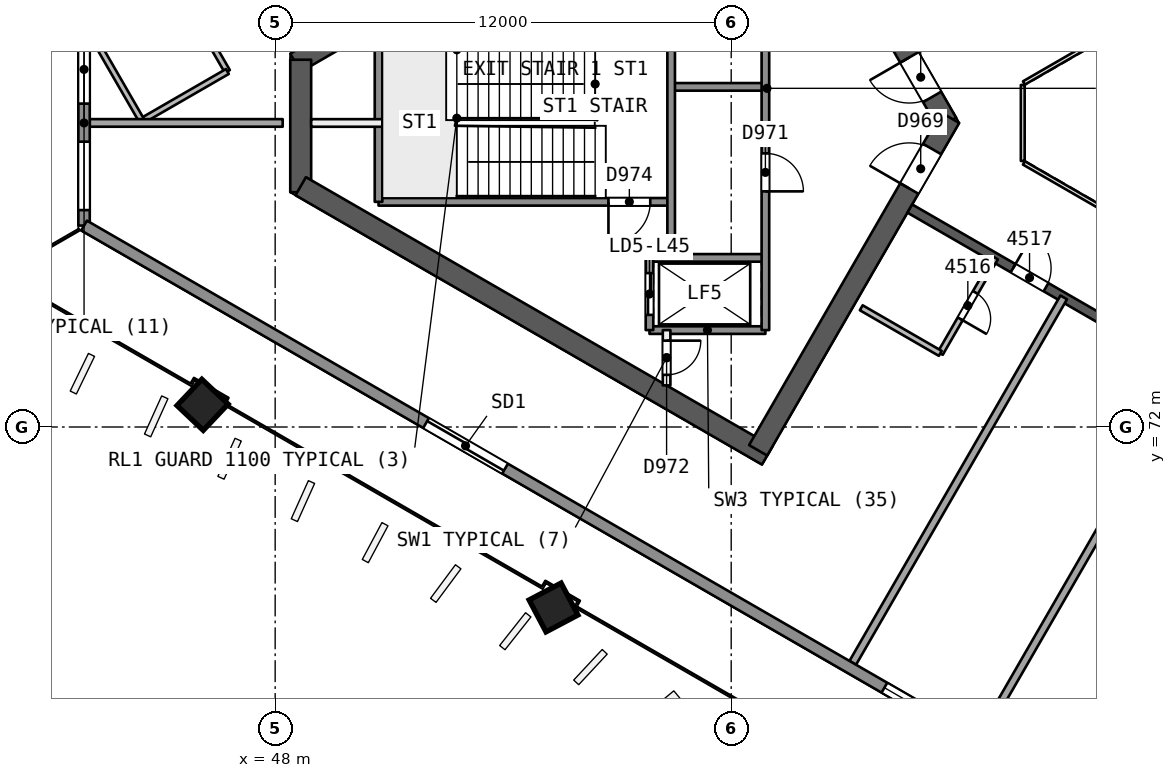
"""IFC4 building model, lengths in metres.
Left out: names, types, materials, properties, quantities, classifications, styles, units other than length and angle.
Written with IfcOpenShell. Run it as: python <this file> out.ifc"""

import sys

from ifc_helpers import new_model, si_unit, direction, frame, frame_2d, origin, origin_2d, place, context, subcontext, project, spatial, rectangle, extrude, element, fill, save


model = new_model("IFC4")
c1 = context("Model", 3, precision=1e-05, world=origin(), true_north=direction((0.0, 1.0)))
c2 = subcontext(c1, "Body", "Model", "MODEL_VIEW")
j1 = project(units=[si_unit("LENGTHUNIT", "METRE"), si_unit("PLANEANGLEUNIT", "RADIAN")], contexts=[c1])
p1 = place(None, origin())
s1 = spatial("IfcSite", under=j1, at=p1, CompositionType="ELEMENT")
p2 = place(p1, origin())
s2 = spatial("IfcBuilding", under=s1, at=p2, CompositionType="ELEMENT")
p3 = place(p2, frame((0.0, 0.0, 185.9)))
s3 = spatial("IfcBuildingStorey", under=s2, at=p3, CompositionType="ELEMENT", Elevation=185.9)
p4 = place(p3, frame((65.682, 80.0, 0.0), z_axis=(0.0, 0.0, 1.0), x_axis=(-0.500000202252, 0.866025287014, 0.0)))
e1 = element("IfcWall", 1, at=p4, inside=s3, PredefinedType="SHEAR", context=c2, shape_type="SweptSolid", body=[
    extrude(rectangle(XDim=10.221, YDim=0.55, at=frame_2d((5.111, 0.0))), origin(), (0.0, 0.0, 1.0), 3.7),
])
p5 = place(p4, frame((0.791, 0.0, 0.0)))
e2 = element("IfcOpeningElement", 2, at=p5, cuts=e1, PredefinedType="OPENING", context=c2, shape_type="SweptSolid", body=[
    extrude(rectangle(XDim=1.2, YDim=2.1, at=frame_2d((0.6, 1.05))), frame((0.0, 0.286, 0.0), z_axis=(0.0, -1.0, 0.0), x_axis=(1.0, 0.0, 0.0)), (0.0, 0.0, 1.0), 0.571),
])
p6 = place(p3, frame((60.709, 88.614, 0.0), z_axis=(0.0, 0.0, 1.0), x_axis=(-0.866020164116, -0.500009075263, 0.0)))
e3 = element("IfcWall", 3, at=p6, inside=s3, PredefinedType="SHEAR", context=c2, shape_type="SweptSolid", body=[
    extrude(rectangle(XDim=14.058, YDim=0.55, at=frame_2d((7.029, 0.0))), origin(), (0.0, 0.0, 1.0), 3.7),
])
p7 = place(p3, frame((48.672, 81.664, 0.0), z_axis=(0.0, 0.0, 1.0), x_axis=(0.0, -1.0, 0.0)))
e4 = element("IfcWall", 4, at=p7, inside=s3, PredefinedType="SHEAR", context=c2, shape_type="SweptSolid", body=[
    extrude(rectangle(XDim=3.487, YDim=0.55, at=frame_2d((1.743, 0.0))), origin(), (0.0, 0.0, 1.0), 3.7),
])
p8 = place(p3, frame((48.672, 78.336, 0.0), z_axis=(0.0, 0.0, 1.0), x_axis=(0.866023530946, -0.500003243837, 0.0)))
e5 = element("IfcWall", 5, at=p8, inside=s3, PredefinedType="SHEAR", context=c2, shape_type="SweptSolid", body=[
    extrude(rectangle(XDim=14.175, YDim=0.55, at=frame_2d((7.087, 0.0))), origin(), (0.0, 0.0, 1.0), 3.7),
])
p9 = place(p3, frame((60.709, 71.386, 0.0), z_axis=(0.0, 0.0, 1.0), x_axis=(0.500015938302, 0.866016201606, 0.0)))
e6 = element("IfcWall", 6, at=p9, inside=s3, PredefinedType="SHEAR", context=c2, shape_type="SweptSolid", body=[
    extrude(rectangle(XDim=10.105, YDim=0.55, at=frame_2d((5.053, 0.0))), origin(), (0.0, 0.0, 1.0), 3.7),
])
p10 = place(p9, frame((7.955, 0.0, 0.0)))
e7 = element("IfcOpeningElement", 7, at=p10, cuts=e6, PredefinedType="OPENING", context=c2, shape_type="SweptSolid", body=[
    extrude(rectangle(XDim=1.2, YDim=2.1, at=frame_2d((0.6, 1.05))), frame((0.0, 0.286, 0.0), z_axis=(0.0, -1.0, 0.0), x_axis=(1.0, 0.0, 0.0)), (0.0, 0.0, 1.0), 0.571),
])
p11 = place(p3, frame((64.7, 77.748, 0.0), z_axis=(0.0, 0.0, 1.0), x_axis=(0.866026492143, -0.499998114903, 0.0)))
e8 = element("IfcWall", 8, at=p11, inside=s3, PredefinedType="SHEAR", context=c2, shape_type="SweptSolid", body=[
    extrude(rectangle(XDim=15.588, YDim=0.25, at=frame_2d((7.794, 0.0))), origin(), (0.0, 0.0, 1.0), 3.25),
])
p12 = place(p11, frame((3.138, 0.0, 0.0)))
e9 = element("IfcOpeningElement", 9, at=p12, cuts=e8, PredefinedType="OPENING", context=c2, shape_type="SweptSolid", body=[
    extrude(rectangle(XDim=1.0, YDim=2.1, at=frame_2d((0.5, 1.05))), frame((0.0, 0.135, 0.0), z_axis=(0.0, -1.0, 0.0), x_axis=(1.0, 0.0, 0.0)), (0.0, 0.0, 1.0), 0.271),
])
p13 = place(p11, frame((6.175, 0.0, 0.0)))
e10 = element("IfcOpeningElement", 10, at=p13, cuts=e8, PredefinedType="OPENING", context=c2, shape_type="SweptSolid", body=[
    extrude(rectangle(XDim=0.9, YDim=2.1, at=frame_2d((0.45, 1.05))), frame((0.0, 0.135, 0.0), z_axis=(0.0, -1.0, 0.0), x_axis=(1.0, 0.0, 0.0)), (0.0, 0.0, 1.0), 0.271),
])
p14 = place(p11, frame((10.072, 0.0, 0.0)))
e11 = element("IfcOpeningElement", 11, at=p14, cuts=e8, PredefinedType="OPENING", context=c2, shape_type="SweptSolid", body=[
    extrude(rectangle(XDim=0.9, YDim=2.1, at=frame_2d((0.45, 1.05))), frame((0.0, 0.135, 0.0), z_axis=(0.0, -1.0, 0.0), x_axis=(1.0, 0.0, 0.0)), (0.0, 0.0, 1.0), 0.271),
])
p15 = place(p11, frame((13.53, 0.0, 0.0)))
e12 = element("IfcOpeningElement", 12, at=p15, cuts=e8, PredefinedType="OPENING", context=c2, shape_type="SweptSolid", body=[
    extrude(rectangle(XDim=1.0, YDim=2.1, at=frame_2d((0.5, 1.05))), frame((0.0, 0.135, 0.0), z_axis=(0.0, -1.0, 0.0), x_axis=(1.0, 0.0, 0.0)), (0.0, 0.0, 1.0), 0.271),
])
p16 = place(p3, frame((46.055, 72.575, 0.0), z_axis=(0.028557219273, 0.006859008786, 0.999568626571), x_axis=(-0.86641042505, 0.498876758723, 0.021329673472)))
e13 = element("IfcColumn", 13, at=p16, inside=s3, PredefinedType="COLUMN", context=c2, shape_type="SweptSolid", body=[
    extrude(rectangle(XDim=0.95, YDim=0.95, at=origin_2d()), origin(), (0.0, 0.0, 1.0), 3.702),
])
p17 = place(p3, frame((55.302, 67.237, 0.0), z_axis=(0.019327242333, 0.012137244332, 0.999739538582), x_axis=(-0.865685903399, 0.500474062253, 0.01065972171)))
e14 = element("IfcColumn", 14, at=p17, inside=s3, PredefinedType="COLUMN", context=c2, shape_type="SweptSolid", body=[
    extrude(rectangle(XDim=0.95, YDim=0.95, at=origin_2d()), origin(), (0.0, 0.0, 1.0), 3.701),
])
p18 = place(p3, frame((45.293, 83.866, 0.0), z_axis=(0.0, 0.0, 1.0), x_axis=(0.50005036918, -0.865996321171, 0.0)))
e15 = element("IfcWall", 15, at=p18, inside=s3, PredefinedType="PARTITIONING", context=c2, shape_type="SweptSolid", body=[
    extrude(rectangle(XDim=2.9, YDim=0.15, at=frame_2d((1.45, 0.0))), origin(), (0.0, 0.0, 1.0), 3.25),
])
p19 = place(p18, frame((1.05, 0.0, 0.0)))
e16 = element("IfcOpeningElement", 16, at=p19, cuts=e15, PredefinedType="OPENING", context=c2, shape_type="SweptSolid", body=[
    extrude(rectangle(XDim=0.8, YDim=2.1, at=frame_2d((0.4, 1.05))), frame((0.0, 0.085, 0.0), z_axis=(0.0, -1.0, 0.0), x_axis=(1.0, 0.0, 0.0)), (0.0, 0.0, 1.0), 0.171),
])
p20 = place(p3, frame((46.743, 81.354, 0.0), z_axis=(0.0, 0.0, 1.0), x_axis=(-0.866021400173, -0.500006934395, 0.0)))
e17 = element("IfcWall", 17, at=p20, inside=s3, PredefinedType="PARTITIONING", context=c2, shape_type="SweptSolid", body=[
    extrude(rectangle(XDim=2.6, YDim=0.15, at=frame_2d((1.3, 0.0))), origin(), (0.0, 0.0, 1.0), 3.25),
])
p21 = place(p3, frame((44.491, 80.054, 0.0), z_axis=(0.0, 0.0, 1.0), x_axis=(-0.500035825175, 0.866004719122, 0.0)))
e18 = element("IfcWall", 18, at=p21, inside=s3, PredefinedType="PARTITIONING", context=c2, shape_type="SweptSolid", body=[
    extrude(rectangle(XDim=2.742, YDim=0.15, at=frame_2d((1.371, 0.0))), origin(), (0.0, 0.0, 1.0), 3.25),
])
p22 = place(p3, frame((43.12, 80.001, 0.0), z_axis=(0.0, 0.0, 1.0), x_axis=(1.0, 0.0, 0.0)))
e19 = element("IfcWall", 19, at=p22, inside=s3, PredefinedType="PARTITIONING", context=c2, shape_type="SweptSolid", body=[
    extrude(rectangle(XDim=5.078, YDim=0.2, at=frame_2d((2.539, 0.0))), origin(), (0.0, 0.0, 1.0), 3.25),
])
p23 = place(p3, frame((66.952, 76.448, 0.0), z_axis=(0.0, 0.0, 1.0), x_axis=(-0.499987231761, -0.866032775405, 0.0)))
e20 = element("IfcWall", 20, at=p23, inside=s3, PredefinedType="PARTITIONING", context=c2, shape_type="SweptSolid", body=[
    extrude(rectangle(XDim=2.9, YDim=0.15, at=frame_2d((1.45, 0.0))), origin(), (0.0, 0.0, 1.0), 3.25),
])
p24 = place(p23, frame((1.05, 0.0, 0.0)))
e21 = element("IfcOpeningElement", 21, at=p24, cuts=e20, PredefinedType="OPENING", context=c2, shape_type="SweptSolid", body=[
    extrude(rectangle(XDim=0.8, YDim=2.1, at=frame_2d((0.4, 1.05))), frame((0.0, 0.085, 0.0), z_axis=(0.0, -1.0, 0.0), x_axis=(1.0, 0.0, 0.0)), (0.0, 0.0, 1.0), 0.171),
])
p25 = place(p3, frame((65.502, 73.937, 0.0), z_axis=(0.0, 0.0, 1.0), x_axis=(-0.865994240961, 0.500053971709, 0.0)))
e22 = element("IfcWall", 22, at=p25, inside=s3, PredefinedType="PARTITIONING", context=c2, shape_type="SweptSolid", body=[
    extrude(rectangle(XDim=2.401, YDim=0.15, at=frame_2d((1.201, 0.0))), origin(), (0.0, 0.0, 1.0), 3.25),
])
for number, where, z_axis, x_axis in (
    (23, (63.198, 65.794, 0.0), (0.0, 0.0, 1.0), (0.5, 0.866, 0.0)),
    (24, (66.573, 63.845, 0.0), (0.0, 0.0, 1.0), (0.5, 0.866, 0.0)),
):
    element("IfcWall", number, at=place(p3, frame(where, z_axis=z_axis, x_axis=x_axis)), inside=s3, PredefinedType="PARTITIONING", context=c2, shape_type="SweptSolid", body=[
        extrude(rectangle(XDim=11.104, YDim=0.2, at=frame_2d((5.552, 0.0))), origin(), (0.0, 0.0, 1.0), 3.25),
    ])
p26 = place(p3, frame((42.971, 77.3, 0.0), z_axis=(0.0, 0.0, 1.0), x_axis=(0.0, 1.0, 0.0)))
e25 = element("IfcWall", 25, at=p26, inside=s3, PredefinedType="SOLIDWALL", context=c2, shape_type="SweptSolid", body=[
    extrude(rectangle(XDim=5.399, YDim=0.3, at=frame_2d((2.7, 0.0))), origin(), (0.0, 0.0, 1.0), 3.25),
])
p27 = place(p26, frame((3.209, 0.0, 0.9)))
e26 = element("IfcOpeningElement", 26, at=p27, cuts=e25, PredefinedType="OPENING", context=c2, shape_type="SweptSolid", body=[
    extrude(rectangle(XDim=1.8, YDim=1.5, at=frame_2d((0.9, 0.75))), frame((0.0, 0.161, 0.0), z_axis=(0.0, -1.0, 0.0), x_axis=(1.0, 0.0, 0.0)), (0.0, 0.0, 1.0), 0.321),
])
p28 = place(p26, frame((0.407, 0.0, 0.9)))
e27 = element("IfcOpeningElement", 27, at=p28, cuts=e25, PredefinedType="OPENING", context=c2, shape_type="SweptSolid", body=[
    extrude(rectangle(XDim=1.8, YDim=1.5, at=frame_2d((0.9, 0.75))), frame((0.0, 0.161, 0.0), z_axis=(0.0, -1.0, 0.0), x_axis=(1.0, 0.0, 0.0)), (0.0, 0.0, 1.0), 0.321),
])
p29 = place(p3, frame((88.677, 50.912, 0.0), z_axis=(0.0, 0.0, 1.0), x_axis=(-0.866024890781, 0.500000888547, 0.0)))
e28 = element("IfcWall", 28, at=p29, inside=s3, PredefinedType="SOLIDWALL", context=c2, shape_type="SweptSolid", body=[
    extrude(rectangle(XDim=52.776, YDim=0.3, at=frame_2d((26.388, 0.0))), origin(), (0.0, 0.0, 1.0), 3.25),
])
p30 = place(p29, frame((18.953, 0.0, 0.0)))
e29 = element("IfcOpeningElement", 29, at=p30, cuts=e28, PredefinedType="OPENING", context=c2, shape_type="SweptSolid", body=[
    extrude(rectangle(XDim=2.4, YDim=2.4, at=frame_2d((1.2, 1.2))), frame((0.0, 0.161, 0.0), z_axis=(0.0, -1.0, 0.0), x_axis=(1.0, 0.0, 0.0)), (0.0, 0.0, 1.0), 0.321),
])
p31 = place(p29, frame((9.385, 0.0, 0.0)))
e30 = element("IfcOpeningElement", 30, at=p31, cuts=e28, PredefinedType="OPENING", context=c2, shape_type="SweptSolid", body=[
    extrude(rectangle(XDim=2.4, YDim=2.4, at=frame_2d((1.2, 1.2))), frame((0.0, 0.161, 0.0), z_axis=(0.0, -1.0, 0.0), x_axis=(1.0, 0.0, 0.0)), (0.0, 0.0, 1.0), 0.321),
])
p32 = place(p29, frame((39.984, 0.0, 0.0)))
e31 = element("IfcOpeningElement", 31, at=p32, cuts=e28, PredefinedType="OPENING", context=c2, shape_type="SweptSolid", body=[
    extrude(rectangle(XDim=2.4, YDim=2.4, at=frame_2d((1.2, 1.2))), frame((0.0, 0.161, 0.0), z_axis=(0.0, -1.0, 0.0), x_axis=(1.0, 0.0, 0.0)), (0.0, 0.0, 1.0), 0.321),
])
p33 = place(p29, frame((26.657, 0.0, 0.9)))
e32 = element("IfcOpeningElement", 32, at=p33, cuts=e28, PredefinedType="OPENING", context=c2, shape_type="SweptSolid", body=[
    extrude(rectangle(XDim=1.8, YDim=1.5, at=frame_2d((0.9, 0.75))), frame((0.0, 0.161, 0.0), z_axis=(0.0, -1.0, 0.0), x_axis=(1.0, 0.0, 0.0)), (0.0, 0.0, 1.0), 0.321),
])
p34 = place(p29, frame((22.76, 0.0, 0.9)))
e33 = element("IfcOpeningElement", 33, at=p34, cuts=e28, PredefinedType="OPENING", context=c2, shape_type="SweptSolid", body=[
    extrude(rectangle(XDim=1.8, YDim=1.5, at=frame_2d((0.9, 0.75))), frame((0.0, 0.161, 0.0), z_axis=(0.0, -1.0, 0.0), x_axis=(1.0, 0.0, 0.0)), (0.0, 0.0, 1.0), 0.321),
])
p35 = place(p3, frame((60.9, 80.95, 0.0), z_axis=(0.0, 0.0, 1.0), x_axis=(-1.0, 0.0, 0.0)))
e34 = element("IfcWall", 34, at=p35, inside=s3, PredefinedType="SOLIDWALL", context=c2, shape_type="SweptSolid", body=[
    extrude(rectangle(XDim=2.48, YDim=0.2, at=frame_2d((1.24, 0.0))), origin(), (0.0, 0.0, 1.0), 3.25),
])
p36 = place(p3, frame((50.82, 80.0, 0.0), z_axis=(0.0, 0.0, 1.0), x_axis=(-1.0, 0.0, 0.0)))
e35 = element("IfcWall", 35, at=p36, inside=s3, PredefinedType="PARTITIONING", context=c2, shape_type="SweptSolid", body=[
    extrude(rectangle(XDim=1.873, YDim=0.2, at=frame_2d((0.937, 0.0))), origin(), (0.0, 0.0, 1.0), 3.25),
])
p37 = place(p3, frame((58.42, 77.925, 0.0), z_axis=(0.0, 0.0, 1.0), x_axis=(-1.0, 0.0, 0.0)))
e36 = element("IfcWall", 36, at=p37, inside=s3, PredefinedType="SOLIDWALL", context=c2, shape_type="SweptSolid", body=[
    extrude(rectangle(XDim=7.7, YDim=0.2, at=frame_2d((3.85, 0.0))), origin(), (0.0, 0.0, 1.0), 3.25),
])
p38 = place(p37, frame((0.55, 0.0, 0.0)))
e37 = element("IfcOpeningElement", 37, at=p38, cuts=e36, PredefinedType="OPENING", context=c2, shape_type="SweptSolid", body=[
    extrude(rectangle(XDim=1.1, YDim=2.1, at=frame_2d((0.55, 1.05))), frame((0.0, 0.11, 0.0), z_axis=(0.0, -1.0, 0.0), x_axis=(1.0, 0.0, 0.0)), (0.0, 0.0, 1.0), 0.221),
])
for number, where, z_axis, x_axis in (
    (38, (60.9, 76.45, 0.0), (0.0, 0.0, 1.0), (-1.0, 0.0, 0.0)),
    (39, (60.9, 74.55, 0.0), (0.0, 0.0, 1.0), (-1.0, 0.0, 0.0)),
):
    element("IfcWall", number, at=place(p3, frame(where, z_axis=z_axis, x_axis=x_axis)), inside=s3, PredefinedType="SOLIDWALL", context=c2, shape_type="SweptSolid", body=[
        extrude(rectangle(XDim=3.05, YDim=0.2, at=frame_2d((1.525, 0.0))), origin(), (0.0, 0.0, 1.0), 3.25),
    ])
p39 = place(p3, frame((60.9, 85.45, 0.0), z_axis=(0.0, 0.0, 1.0), x_axis=(0.0, -1.0, 0.0)))
e40 = element("IfcWall", 40, at=p39, inside=s3, PredefinedType="SOLIDWALL", context=c2, shape_type="SweptSolid", body=[
    extrude(rectangle(XDim=10.9, YDim=0.2, at=frame_2d((5.45, 0.0))), origin(), (0.0, 0.0, 1.0), 3.25),
])
p40 = place(p39, frame((1.75, 0.0, 0.0)))
e41 = element("IfcOpeningElement", 41, at=p40, cuts=e40, PredefinedType="OPENING", context=c2, shape_type="SweptSolid", body=[
    extrude(rectangle(XDim=1.0, YDim=2.1, at=frame_2d((0.5, 1.05))), frame((0.0, 0.11, 0.0), z_axis=(0.0, -1.0, 0.0), x_axis=(1.0, 0.0, 0.0)), (0.0, 0.0, 1.0), 0.221),
])
p41 = place(p39, frame((6.25, 0.0, 0.0)))
e42 = element("IfcOpeningElement", 42, at=p41, cuts=e40, PredefinedType="OPENING", context=c2, shape_type="SweptSolid", body=[
    extrude(rectangle(XDim=1.0, YDim=2.1, at=frame_2d((0.5, 1.05))), frame((0.0, 0.11, 0.0), z_axis=(0.0, -1.0, 0.0), x_axis=(1.0, 0.0, 0.0)), (0.0, 0.0, 1.0), 0.221),
])
p42 = place(p3, frame((58.42, 86.974, 0.0), z_axis=(0.0, 0.0, 1.0), x_axis=(0.0, -1.0, 0.0)))
e43 = element("IfcWall", 43, at=p42, inside=s3, PredefinedType="SOLIDWALL", context=c2, shape_type="SweptSolid", body=[
    extrude(rectangle(XDim=10.524, YDim=0.2, at=frame_2d((5.262, 0.0))), origin(), (0.0, 0.0, 1.0), 3.25),
])
p43 = place(p42, frame((0.312, 0.0, 0.0)))
e44 = element("IfcOpeningElement", 44, at=p43, cuts=e43, PredefinedType="OPENING", context=c2, shape_type="SweptSolid", body=[
    extrude(rectangle(XDim=0.9, YDim=2.1, at=frame_2d((0.45, 1.05))), frame((0.0, 0.11, 0.0), z_axis=(0.0, -1.0, 0.0), x_axis=(1.0, 0.0, 0.0)), (0.0, 0.0, 1.0), 0.221),
])
p44 = place(p3, frame((58.3, 74.55, 0.0), z_axis=(0.0, 0.0, 1.0), x_axis=(0.0, -1.0, 0.0)))
e45 = element("IfcWall", 45, at=p44, inside=s3, PredefinedType="PARTITIONING", context=c2, shape_type="SweptSolid", body=[
    extrude(rectangle(XDim=1.455, YDim=0.2, at=frame_2d((0.728, 0.0))), origin(), (0.0, 0.0, 1.0), 3.25),
])
p45 = place(p44, frame((0.278, 0.0, 0.0)))
e46 = element("IfcOpeningElement", 46, at=p45, cuts=e45, PredefinedType="OPENING", context=c2, shape_type="SweptSolid", body=[
    extrude(rectangle(XDim=0.9, YDim=2.1, at=frame_2d((0.45, 1.05))), frame((0.0, 0.11, 0.0), z_axis=(0.0, -1.0, 0.0), x_axis=(1.0, 0.0, 0.0)), (0.0, 0.0, 1.0), 0.221),
])
p46 = place(p3, frame((57.85, 76.45, 0.0), z_axis=(0.0, 0.0, 1.0), x_axis=(0.0, -1.0, 0.0)))
e47 = element("IfcWall", 47, at=p46, inside=s3, PredefinedType="SOLIDWALL", context=c2, shape_type="SweptSolid", body=[
    extrude(rectangle(XDim=1.9, YDim=0.2, at=frame_2d((0.95, 0.0))), origin(), (0.0, 0.0, 1.0), 3.25),
])
p47 = place(p46, frame((0.4, 0.0, 0.0)))
e48 = element("IfcOpeningElement", 48, at=p47, cuts=e47, PredefinedType="OPENING", context=c2, shape_type="SweptSolid", body=[
    extrude(rectangle(XDim=1.1, YDim=2.1, at=frame_2d((0.55, 1.05))), frame((0.0, 0.11, 0.0), z_axis=(0.0, -1.0, 0.0), x_axis=(1.0, 0.0, 0.0)), (0.0, 0.0, 1.0), 0.221),
])
p48 = place(p3, frame((50.72, 82.075, 0.0), z_axis=(0.0, 0.0, 1.0), x_axis=(0.0, -1.0, 0.0)))
e49 = element("IfcWall", 49, at=p48, inside=s3, PredefinedType="SOLIDWALL", context=c2, shape_type="SweptSolid", body=[
    extrude(rectangle(XDim=4.15, YDim=0.2, at=frame_2d((2.075, 0.0))), origin(), (0.0, 0.0, 1.0), 3.25),
])
p49 = place(p3, frame((77.738, 86.846, 0.0), z_axis=(0.0, 0.0, 1.0), x_axis=(-0.866026658274, -0.499997827154, 0.0)))
e50 = element("IfcWall", 50, at=p49, inside=s3, PredefinedType="PARTITIONING", context=c2, shape_type="SweptSolid", body=[
    extrude(rectangle(XDim=11.588, YDim=0.1, at=frame_2d((5.794, 0.0))), origin(), (0.0, 0.0, 1.0), 3.25),
])
p50 = place(p3, frame((67.672, 81.0, 0.0), z_axis=(0.0, 0.0, 1.0), x_axis=(0.0, -1.0, 0.0)))
e51 = element("IfcWall", 51, at=p50, inside=s3, PredefinedType="PARTITIONING", context=c2, shape_type="SweptSolid", body=[
    extrude(rectangle(XDim=2.0, YDim=0.1, at=frame_2d((1.0, 0.0))), origin(), (0.0, 0.0, 1.0), 3.25),
])
p51 = place(p3, frame((67.702, 78.948, 0.0), z_axis=(0.0, 0.0, 1.0), x_axis=(0.866026658274, -0.499997827154, 0.0)))
e52 = element("IfcWall", 52, at=p51, inside=s3, PredefinedType="PARTITIONING", context=c2, shape_type="SweptSolid", body=[
    extrude(rectangle(XDim=11.588, YDim=0.1, at=frame_2d((5.794, 0.0))), origin(), (0.0, 0.0, 1.0), 3.25),
])
p52 = place(p24, origin())
e53 = element("IfcDoor", 53, at=p52, inside=s3, OperationType="SINGLE_SWING_RIGHT", PredefinedType="NOTDEFINED", context=c2, shape_type="SweptSolid", body=[
    extrude(rectangle(XDim=0.8, YDim=2.1, at=frame_2d((0.4, 1.05))), frame((0.0, 0.025, 0.0), z_axis=(0.0, -1.0, 0.0), x_axis=(1.0, 0.0, 0.0)), (0.0, 0.0, 1.0), 0.05),
])
fill(e21, e53)
p53 = place(p12, origin())
e54 = element("IfcDoor", 54, at=p53, inside=s3, OperationType="SINGLE_SWING_LEFT", PredefinedType="NOTDEFINED", context=c2, shape_type="SweptSolid", body=[
    extrude(rectangle(XDim=1.0, YDim=2.1, at=frame_2d((0.5, 1.05))), frame((0.0, 0.025, 0.0), z_axis=(0.0, -1.0, 0.0), x_axis=(1.0, 0.0, 0.0)), (0.0, 0.0, 1.0), 0.05),
])
fill(e9, e54)
p54 = place(p27, origin())
e55 = element("IfcWindow", 55, at=p54, inside=s3, PartitioningType="SINGLE_PANEL", PredefinedType="WINDOW", context=c2, shape_type="SweptSolid", body=[
    extrude(rectangle(XDim=1.8, YDim=1.5, at=frame_2d((0.9, 0.75))), frame((0.0, 0.03, 0.0), z_axis=(0.0, -1.0, 0.0), x_axis=(1.0, 0.0, 0.0)), (0.0, 0.0, 1.0), 0.06),
])
fill(e26, e55)
p55 = place(p28, origin())
e56 = element("IfcWindow", 56, at=p55, inside=s3, PartitioningType="SINGLE_PANEL", PredefinedType="WINDOW", context=c2, shape_type="SweptSolid", body=[
    extrude(rectangle(XDim=1.8, YDim=1.5, at=frame_2d((0.9, 0.75))), frame((0.0, 0.03, 0.0), z_axis=(0.0, -1.0, 0.0), x_axis=(1.0, 0.0, 0.0)), (0.0, 0.0, 1.0), 0.06),
])
fill(e27, e56)
p56 = place(p32, origin())
e57 = element("IfcDoor", 57, at=p56, inside=s3, OperationType="SLIDING_TO_LEFT", PredefinedType="NOTDEFINED", context=c2, shape_type="SweptSolid", body=[
    extrude(rectangle(XDim=2.4, YDim=2.4, at=frame_2d((1.2, 1.2))), frame((0.0, 0.025, 0.0), z_axis=(0.0, -1.0, 0.0), x_axis=(1.0, 0.0, 0.0)), (0.0, 0.0, 1.0), 0.05),
])
fill(e31, e57)
p57 = place(p33, origin())
e58 = element("IfcWindow", 58, at=p57, inside=s3, PartitioningType="SINGLE_PANEL", PredefinedType="WINDOW", context=c2, shape_type="SweptSolid", body=[
    extrude(rectangle(XDim=1.8, YDim=1.5, at=frame_2d((0.9, 0.75))), frame((0.0, 0.03, 0.0), z_axis=(0.0, -1.0, 0.0), x_axis=(1.0, 0.0, 0.0)), (0.0, 0.0, 1.0), 0.06),
])
fill(e32, e58)
p58 = place(p5, origin())
e59 = element("IfcDoor", 59, at=p58, inside=s3, OperationType="SINGLE_SWING_RIGHT", PredefinedType="NOTDEFINED", context=c2, shape_type="SweptSolid", body=[
    extrude(rectangle(XDim=1.2, YDim=2.1, at=frame_2d((0.6, 1.05))), frame((0.0, 0.025, 0.0), z_axis=(0.0, -1.0, 0.0), x_axis=(1.0, 0.0, 0.0)), (0.0, 0.0, 1.0), 0.05),
])
fill(e2, e59)
p59 = place(p10, origin())
e60 = element("IfcDoor", 60, at=p59, inside=s3, OperationType="SINGLE_SWING_LEFT", PredefinedType="NOTDEFINED", context=c2, shape_type="SweptSolid", body=[
    extrude(rectangle(XDim=1.2, YDim=2.1, at=frame_2d((0.6, 1.05))), frame((0.0, 0.025, 0.0), z_axis=(0.0, -1.0, 0.0), x_axis=(1.0, 0.0, 0.0)), (0.0, 0.0, 1.0), 0.05),
])
fill(e7, e60)
p60 = place(p47, origin())
e61 = element("IfcDoor", 61, at=p60, inside=s3, OperationType="SLIDING_TO_RIGHT", PredefinedType="NOTDEFINED", context=c2, shape_type="SweptSolid", body=[
    extrude(rectangle(XDim=1.1, YDim=2.1, at=frame_2d((0.55, 1.05))), frame((0.0, 0.025, 0.0), z_axis=(0.0, -1.0, 0.0), x_axis=(1.0, 0.0, 0.0)), (0.0, 0.0, 1.0), 0.05),
])
fill(e48, e61)
p61 = place(p41, origin())
e62 = element("IfcDoor", 62, at=p61, inside=s3, OperationType="SINGLE_SWING_RIGHT", PredefinedType="NOTDEFINED", context=c2, shape_type="SweptSolid", body=[
    extrude(rectangle(XDim=1.0, YDim=2.1, at=frame_2d((0.5, 1.05))), frame((0.0, 0.025, 0.0), z_axis=(0.0, -1.0, 0.0), x_axis=(1.0, 0.0, 0.0)), (0.0, 0.0, 1.0), 0.05),
])
fill(e42, e62)
p62 = place(p45, origin())
e63 = element("IfcDoor", 63, at=p62, inside=s3, OperationType="SINGLE_SWING_LEFT", PredefinedType="NOTDEFINED", context=c2, shape_type="SweptSolid", body=[
    extrude(rectangle(XDim=0.9, YDim=2.1, at=frame_2d((0.45, 1.05))), frame((0.0, 0.025, 0.0), z_axis=(0.0, -1.0, 0.0), x_axis=(1.0, 0.0, 0.0)), (0.0, 0.0, 1.0), 0.05),
])
fill(e46, e63)
p63 = place(p38, origin())
e64 = element("IfcDoor", 64, at=p63, inside=s3, OperationType="SINGLE_SWING_RIGHT", PredefinedType="NOTDEFINED", context=c2, shape_type="SweptSolid", body=[
    extrude(rectangle(XDim=1.1, YDim=2.1, at=frame_2d((0.55, 1.05))), frame((0.0, 0.025, 0.0), z_axis=(0.0, -1.0, 0.0), x_axis=(1.0, 0.0, 0.0)), (0.0, 0.0, 1.0), 0.05),
])
fill(e37, e64)
save(model, sys.argv[1])
